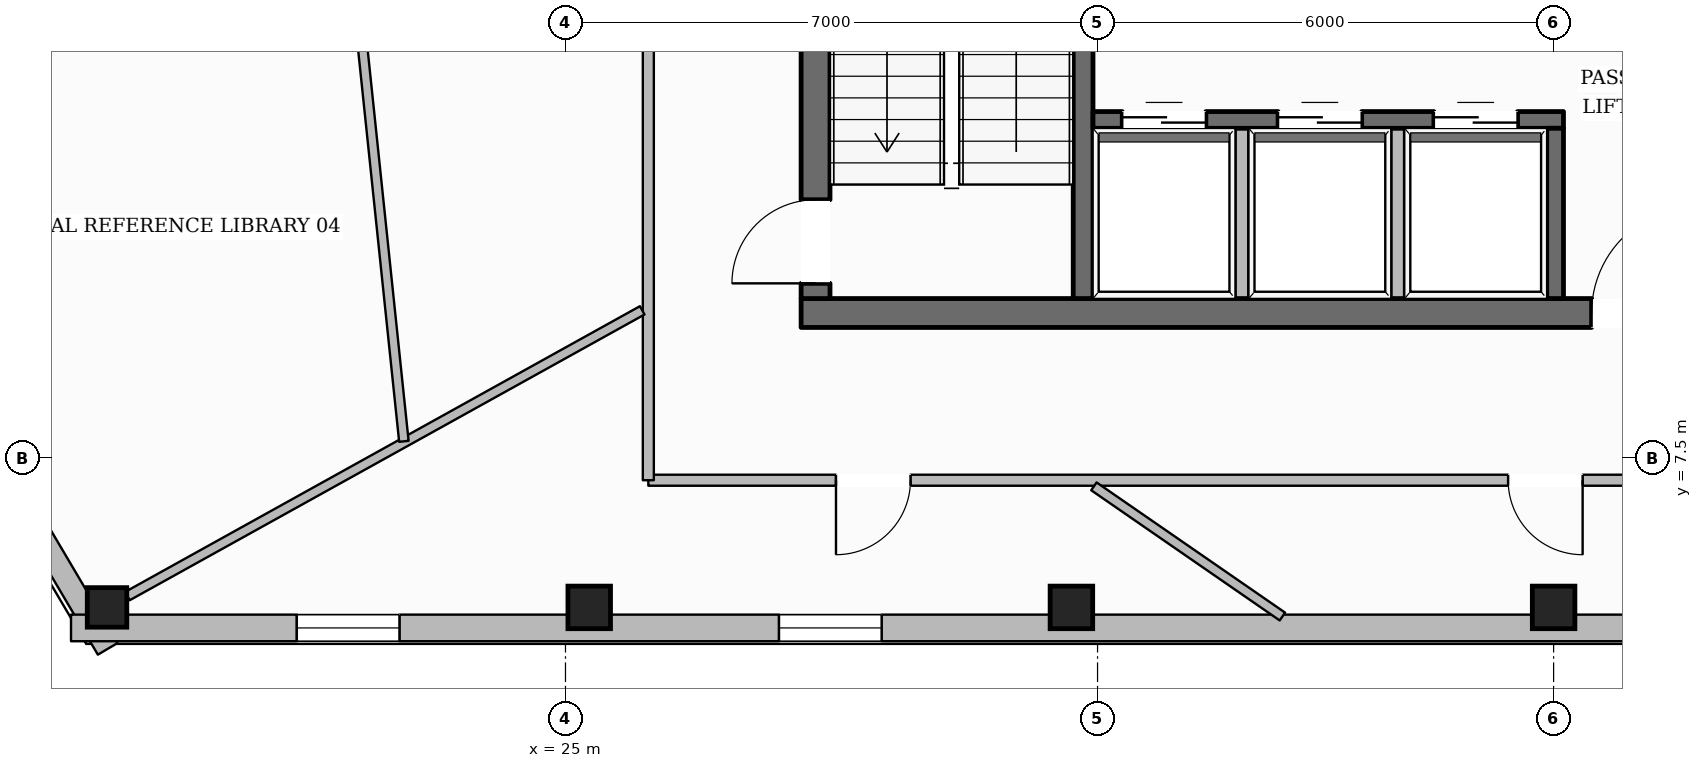
"""IFC4 building model, lengths in metres.
Left out: names, types, materials, properties, quantities, classifications, styles, units other than length and angle.
Written with IfcOpenShell. Run it as: python <this file> out.ifc"""

import sys

from ifc_helpers import new_model, si_unit, direction, frame, frame_2d, origin, origin_2d, place, context, subcontext, project, spatial, rectangle, hollow_rectangle, extrude, element, fill, save


model = new_model("IFC4")
c1 = context("Model", 3, precision=1e-05, world=origin(), true_north=direction((0.0, 1.0)))
c2 = subcontext(c1, "Body", "Model", "MODEL_VIEW")
j1 = project(units=[si_unit("LENGTHUNIT", "METRE"), si_unit("PLANEANGLEUNIT", "RADIAN")], contexts=[c1])
p1 = place(None, origin())
s1 = spatial("IfcSite", under=j1, at=p1, CompositionType="ELEMENT")
p2 = place(p1, origin())
s2 = spatial("IfcBuilding", under=s1, at=p2, CompositionType="ELEMENT")
p3 = place(p2, frame((0.0, 0.0, 274.15)))
s3 = spatial("IfcBuildingStorey", under=s2, at=p3, CompositionType="ELEMENT", Elevation=274.15)
p4 = place(p3, frame((28.1, 9.41, 0.0), z_axis=(0.0, 0.0, 1.0), x_axis=(1.0, 0.0, 0.0)))
e1 = element("IfcWall", 1, at=p4, inside=s3, PredefinedType="SOLIDWALL", context=c2, shape_type="SweptSolid", body=[
    extrude(rectangle(XDim=19.8, YDim=0.38, at=frame_2d((9.9, 0.0))), origin(), (0.0, 0.0, 1.0), 3.61),
])
p5 = place(p4, frame((10.4, 0.0, 0.0)))
e2 = element("IfcOpeningElement", 2, at=p5, cuts=e1, PredefinedType="OPENING", context=c2, shape_type="SweptSolid", body=[
    extrude(rectangle(XDim=1.4, YDim=2.2, at=frame_2d((0.7, 1.1))), frame((0.0, 0.2, 0.0), z_axis=(0.0, -1.0, 0.0), x_axis=(1.0, 0.0, 0.0)), (0.0, 0.0, 1.0), 0.4),
])
p6 = place(p3, frame((28.29, 9.6, 0.0), z_axis=(0.0, 0.0, 1.0), x_axis=(0.0, 1.0, 0.0)))
e3 = element("IfcWall", 3, at=p6, inside=s3, PredefinedType="SOLIDWALL", context=c2, shape_type="SweptSolid", body=[
    extrude(rectangle(XDim=13.0, YDim=0.38, at=frame_2d((6.5, 0.0))), origin(), (0.0, 0.0, 1.0), 3.61),
])
p7 = place(p6, frame((0.2, 0.0, 0.0)))
e4 = element("IfcOpeningElement", 4, at=p7, cuts=e3, PredefinedType="OPENING", context=c2, shape_type="SweptSolid", body=[
    extrude(rectangle(XDim=1.1, YDim=2.15, at=frame_2d((0.55, 1.075))), frame((0.0, 0.2, 0.0), z_axis=(0.0, -1.0, 0.0), x_axis=(1.0, 0.0, 0.0)), (0.0, 0.0, 1.0), 0.4),
])
p8 = place(p6, frame((8.4, 0.0, 0.0)))
e5 = element("IfcOpeningElement", 5, at=p8, cuts=e3, PredefinedType="OPENING", context=c2, shape_type="SweptSolid", body=[
    extrude(rectangle(XDim=0.9, YDim=2.1, at=frame_2d((0.45, 1.05))), frame((0.0, 0.2, 0.0), z_axis=(0.0, -1.0, 0.0), x_axis=(1.0, 0.0, 0.0)), (0.0, 0.0, 1.0), 0.4),
])
p9 = place(p3, frame((31.81, 9.6, 0.0), z_axis=(0.0, 0.0, 1.0), x_axis=(0.0, 1.0, 0.0)))
e6 = element("IfcWall", 6, at=p9, inside=s3, PredefinedType="SHEAR", context=c2, shape_type="SweptSolid", body=[
    extrude(rectangle(XDim=13.0, YDim=0.26, at=frame_2d((6.5, 0.0))), origin(), (0.0, 0.0, 1.0), 3.61),
])
p10 = place(p9, frame((10.925, 0.0, 0.0)))
e7 = element("IfcOpeningElement", 7, at=p10, cuts=e6, PredefinedType="OPENING", context=c2, shape_type="SweptSolid", body=[
    extrude(rectangle(XDim=1.25, YDim=2.25, at=frame_2d((0.625, 1.125))), frame((0.0, 0.14, 0.0), z_axis=(0.0, -1.0, 0.0), x_axis=(1.0, 0.0, 0.0)), (0.0, 0.0, 1.0), 0.28),
])
p11 = place(p3, frame((31.94, 11.95, 0.0), z_axis=(0.0, 0.0, 1.0), x_axis=(1.0, 0.0, 0.0)))
e8 = element("IfcWall", 8, at=p11, inside=s3, PredefinedType="SOLIDWALL", context=c2, shape_type="SweptSolid", body=[
    extrude(rectangle(XDim=6.19, YDim=0.22, at=frame_2d((3.095, 0.0))), origin(), (0.0, 0.0, 1.0), 3.61),
])
p12 = place(p11, frame((0.385, 0.0, 0.0)))
e9 = element("IfcOpeningElement", 9, at=p12, cuts=e8, PredefinedType="OPENING", context=c2, shape_type="SweptSolid", body=[
    extrude(rectangle(XDim=1.1, YDim=2.2, at=frame_2d((0.55, 1.1))), frame((0.0, 0.12, 0.0), z_axis=(0.0, -1.0, 0.0), x_axis=(1.0, 0.0, 0.0)), (0.0, 0.0, 1.0), 0.24),
])
p13 = place(p11, frame((2.435, 0.0, 0.0)))
e10 = element("IfcOpeningElement", 10, at=p13, cuts=e8, PredefinedType="OPENING", context=c2, shape_type="SweptSolid", body=[
    extrude(rectangle(XDim=1.1, YDim=2.2, at=frame_2d((0.55, 1.1))), frame((0.0, 0.12, 0.0), z_axis=(0.0, -1.0, 0.0), x_axis=(1.0, 0.0, 0.0)), (0.0, 0.0, 1.0), 0.24),
])
p14 = place(p11, frame((4.485, 0.0, 0.0)))
e11 = element("IfcOpeningElement", 11, at=p14, cuts=e8, PredefinedType="OPENING", context=c2, shape_type="SweptSolid", body=[
    extrude(rectangle(XDim=1.1, YDim=2.2, at=frame_2d((0.55, 1.1))), frame((0.0, 0.12, 0.0), z_axis=(0.0, -1.0, 0.0), x_axis=(1.0, 0.0, 0.0)), (0.0, 0.0, 1.0), 0.24),
])
p15 = place(p3, frame((38.02, 9.6, 0.0), z_axis=(0.0, 0.0, 1.0), x_axis=(0.0, 1.0, 0.0)))
e12 = element("IfcWall", 12, at=p15, inside=s3, PredefinedType="SOLIDWALL", context=c2, shape_type="SweptSolid", body=[
    extrude(rectangle(XDim=2.24, YDim=0.22, at=frame_2d((1.12, 0.0))), origin(), (0.0, 0.0, 1.0), 3.61),
])
p16 = place(p3, frame((18.969, 5.537, 0.0), z_axis=(0.0, 0.0, 1.0), x_axis=(1.0, 0.0, 0.0)))
e13 = element("IfcColumn", 13, at=p16, inside=s3, PredefinedType="COLUMN", context=c2, shape_type="SweptSolid", body=[
    extrude(hollow_rectangle(XDim=0.52, YDim=0.52, WallThickness=0.024, at=origin_2d()), origin(), (0.0, 0.0, 1.0), 3.61),
])
for number, where, z_axis, x_axis in (
    (14, (25.312, 5.537, 0.0), (0.0, 0.0, 1.0), (1.0, 0.0, 0.0)),
    (15, (31.656, 5.537, 0.0), (0.0, 0.0, 1.0), (1.0, 0.0, 0.0)),
    (16, (38.0, 5.537, 0.0), (0.0, 0.0, 1.0), (1.0, 0.0, 0.0)),
):
    element("IfcColumn", number, at=place(p3, frame(where, z_axis=z_axis, x_axis=x_axis)), inside=s3, PredefinedType="COLUMN", context=c2, shape_type="SweptSolid", body=[
        extrude(hollow_rectangle(XDim=0.56, YDim=0.56, WallThickness=0.025, at=origin_2d()), origin(), (0.0, 0.0, 1.0), 3.61),
    ])
p17 = place(p3, frame((15.485, 10.343, 0.0), z_axis=(0.0, 0.0, 1.0), x_axis=(0.508715156146, 0.860934892955, 0.0)))
e17 = element("IfcWall", 17, at=p17, inside=s3, PredefinedType="STANDARD", context=c2, shape_type="SweptSolid", body=[
    extrude(rectangle(XDim=38.349, YDim=0.35, at=frame_2d((19.175, 0.0))), origin(), (0.0, 0.0, 1.0), 3.196),
])
p18 = place(p17, frame((34.084, 0.0, 0.65)))
e18 = element("IfcOpeningElement", 18, at=p18, cuts=e17, PredefinedType="OPENING", context=c2, shape_type="SweptSolid", body=[
    extrude(rectangle(XDim=1.35, YDim=1.75, at=frame_2d((0.675, 0.875))), frame((0.0, 0.185, 0.0), z_axis=(0.0, -1.0, 0.0), x_axis=(1.0, 0.0, 0.0)), (0.0, 0.0, 1.0), 0.37),
])
p19 = place(p17, frame((27.852, 0.0, 0.65)))
e19 = element("IfcOpeningElement", 19, at=p19, cuts=e17, PredefinedType="OPENING", context=c2, shape_type="SweptSolid", body=[
    extrude(rectangle(XDim=1.35, YDim=1.75, at=frame_2d((0.675, 0.875))), frame((0.0, 0.185, 0.0), z_axis=(0.0, -1.0, 0.0), x_axis=(1.0, 0.0, 0.0)), (0.0, 0.0, 1.0), 0.37),
])
p20 = place(p17, frame((15.388, 0.0, 0.65)))
e20 = element("IfcOpeningElement", 20, at=p20, cuts=e17, PredefinedType="OPENING", context=c2, shape_type="SweptSolid", body=[
    extrude(rectangle(XDim=1.35, YDim=1.75, at=frame_2d((0.675, 0.875))), frame((0.0, 0.185, 0.0), z_axis=(0.0, -1.0, 0.0), x_axis=(1.0, 0.0, 0.0)), (0.0, 0.0, 1.0), 0.37),
])
p21 = place(p17, frame((9.156, 0.0, 0.65)))
e21 = element("IfcOpeningElement", 21, at=p21, cuts=e17, PredefinedType="OPENING", context=c2, shape_type="SweptSolid", body=[
    extrude(rectangle(XDim=1.35, YDim=1.75, at=frame_2d((0.675, 0.875))), frame((0.0, 0.185, 0.0), z_axis=(0.0, -1.0, 0.0), x_axis=(1.0, 0.0, 0.0)), (0.0, 0.0, 1.0), 0.37),
])
p22 = place(p17, frame((2.925, 0.0, 0.65)))
e22 = element("IfcOpeningElement", 22, at=p22, cuts=e17, PredefinedType="OPENING", context=c2, shape_type="SweptSolid", body=[
    extrude(rectangle(XDim=1.35, YDim=1.75, at=frame_2d((0.675, 0.875))), frame((0.0, 0.185, 0.0), z_axis=(0.0, -1.0, 0.0), x_axis=(1.0, 0.0, 0.0)), (0.0, 0.0, 1.0), 0.37),
])
p23 = place(p3, frame((18.977, 4.991, 0.0), z_axis=(0.0, 0.0, 1.0), x_axis=(-0.508725717469, 0.86092865232, 0.0)))
e23 = element("IfcWall", 23, at=p23, inside=s3, PredefinedType="STANDARD", context=c2, shape_type="SweptSolid", body=[
    extrude(rectangle(XDim=6.865, YDim=0.3, at=frame_2d((3.432, 0.0))), origin(), (0.0, 0.0, 1.0), 3.196),
])
p24 = place(p23, frame((2.907, 0.0, 0.65)))
e24 = element("IfcOpeningElement", 24, at=p24, cuts=e23, PredefinedType="OPENING", context=c2, shape_type="SweptSolid", body=[
    extrude(rectangle(XDim=1.05, YDim=1.7, at=frame_2d((0.525, 0.85))), frame((0.0, 0.16, 0.0), z_axis=(0.0, -1.0, 0.0), x_axis=(1.0, 0.0, 0.0)), (0.0, 0.0, 1.0), 0.32),
])
p25 = place(p3, frame((57.505, 5.267, 0.0), z_axis=(0.0, 0.0, 1.0), x_axis=(-1.0, 0.0, 0.0)))
e25 = element("IfcWall", 25, at=p25, inside=s3, PredefinedType="STANDARD", context=c2, shape_type="SweptSolid", body=[
    extrude(rectangle(XDim=39.011, YDim=0.35, at=frame_2d((19.505, 0.0))), origin(), (0.0, 0.0, 1.0), 3.196),
])
p26 = place(p25, frame((34.69, 0.0, 0.65)))
e26 = element("IfcOpeningElement", 26, at=p26, cuts=e25, PredefinedType="OPENING", context=c2, shape_type="SweptSolid", body=[
    extrude(rectangle(XDim=1.35, YDim=1.75, at=frame_2d((0.675, 0.875))), frame((0.0, 0.185, 0.0), z_axis=(0.0, -1.0, 0.0), x_axis=(1.0, 0.0, 0.0)), (0.0, 0.0, 1.0), 0.37),
])
p27 = place(p25, frame((28.346, 0.0, 0.65)))
e27 = element("IfcOpeningElement", 27, at=p27, cuts=e25, PredefinedType="OPENING", context=c2, shape_type="SweptSolid", body=[
    extrude(rectangle(XDim=1.35, YDim=1.75, at=frame_2d((0.675, 0.875))), frame((0.0, 0.185, 0.0), z_axis=(0.0, -1.0, 0.0), x_axis=(1.0, 0.0, 0.0)), (0.0, 0.0, 1.0), 0.37),
])
p28 = place(p25, frame((15.658, 0.0, 0.65)))
e28 = element("IfcOpeningElement", 28, at=p28, cuts=e25, PredefinedType="OPENING", context=c2, shape_type="SweptSolid", body=[
    extrude(rectangle(XDim=1.35, YDim=1.75, at=frame_2d((0.675, 0.875))), frame((0.0, 0.185, 0.0), z_axis=(0.0, -1.0, 0.0), x_axis=(1.0, 0.0, 0.0)), (0.0, 0.0, 1.0), 0.37),
])
p29 = place(p25, frame((9.315, 0.0, 0.65)))
e29 = element("IfcOpeningElement", 29, at=p29, cuts=e25, PredefinedType="OPENING", context=c2, shape_type="SweptSolid", body=[
    extrude(rectangle(XDim=1.35, YDim=1.75, at=frame_2d((0.675, 0.875))), frame((0.0, 0.185, 0.0), z_axis=(0.0, -1.0, 0.0), x_axis=(1.0, 0.0, 0.0)), (0.0, 0.0, 1.0), 0.37),
])
p30 = place(p25, frame((2.971, 0.0, 0.65)))
e30 = element("IfcOpeningElement", 30, at=p30, cuts=e25, PredefinedType="OPENING", context=c2, shape_type="SweptSolid", body=[
    extrude(rectangle(XDim=1.35, YDim=1.75, at=frame_2d((0.675, 0.875))), frame((0.0, 0.185, 0.0), z_axis=(0.0, -1.0, 0.0), x_axis=(1.0, 0.0, 0.0)), (0.0, 0.0, 1.0), 0.37),
])
for number, where, z_axis, x_axis in (
    (31, (33.9, 9.49, 0.0), (0.0, 0.0, 1.0), (0.0, 1.0, 0.0)),
    (32, (35.95, 9.49, 0.0), (0.0, 0.0, 1.0), (0.0, 1.0, 0.0)),
):
    element("IfcWall", number, at=place(p3, frame(where, z_axis=z_axis, x_axis=x_axis)), inside=s3, PredefinedType="PARTITIONING", context=c2, shape_type="SweptSolid", body=[
        extrude(rectangle(XDim=2.35, YDim=0.165, at=frame_2d((1.175, 0.0))), origin(), (0.0, 0.0, 1.0), 3.61),
    ])
p31 = place(p3, frame((49.91, 7.21, 0.0), z_axis=(0.0, 0.0, 1.0), x_axis=(-1.0, 0.0, 0.0)))
e33 = element("IfcWall", 33, at=p31, inside=s3, PredefinedType="PARTITIONING", context=c2, shape_type="SweptSolid", body=[
    extrude(rectangle(XDim=23.82, YDim=0.145, at=frame_2d((11.91, 0.0))), origin(), (0.0, 0.0, 1.0), 3.61),
])
p32 = place(p31, frame((11.528, 0.0, 0.0)))
e34 = element("IfcOpeningElement", 34, at=p32, cuts=e33, PredefinedType="OPENING", context=c2, shape_type="SweptSolid", body=[
    extrude(rectangle(XDim=0.98, YDim=2.15, at=frame_2d((0.49, 1.075))), frame((0.0, 0.083, 0.0), z_axis=(0.0, -1.0, 0.0), x_axis=(1.0, 0.0, 0.0)), (0.0, 0.0, 1.0), 0.165),
])
p33 = place(p31, frame((20.371, 0.0, 0.0)))
e35 = element("IfcOpeningElement", 35, at=p33, cuts=e33, PredefinedType="OPENING", context=c2, shape_type="SweptSolid", body=[
    extrude(rectangle(XDim=0.98, YDim=2.15, at=frame_2d((0.49, 1.075))), frame((0.0, 0.083, 0.0), z_axis=(0.0, -1.0, 0.0), x_axis=(1.0, 0.0, 0.0)), (0.0, 0.0, 1.0), 0.165),
])
p34 = place(p31, frame((2.444, 0.0, 0.0)))
e36 = element("IfcOpeningElement", 36, at=p34, cuts=e33, PredefinedType="OPENING", context=c2, shape_type="SweptSolid", body=[
    extrude(rectangle(XDim=1.4, YDim=2.2, at=frame_2d((0.7, 1.1))), frame((0.0, 0.083, 0.0), z_axis=(0.0, -1.0, 0.0), x_axis=(1.0, 0.0, 0.0)), (0.0, 0.0, 1.0), 0.165),
])
p35 = place(p3, frame((26.09, 7.21, 0.0), z_axis=(0.0, 0.0, 1.0), x_axis=(0.0, 1.0, 0.0)))
e37 = element("IfcWall", 37, at=p35, inside=s3, PredefinedType="PARTITIONING", context=c2, shape_type="SweptSolid", body=[
    extrude(rectangle(XDim=17.78, YDim=0.145, at=frame_2d((8.89, 0.0))), origin(), (0.0, 0.0, 1.0), 3.349),
])
p36 = place(p35, frame((9.425, 0.0, 0.0)))
e38 = element("IfcOpeningElement", 38, at=p36, cuts=e37, PredefinedType="OPENING", context=c2, shape_type="SweptSolid", body=[
    extrude(rectangle(XDim=1.02, YDim=2.15, at=frame_2d((0.51, 1.075))), frame((0.0, 0.083, 0.0), z_axis=(0.0, -1.0, 0.0), x_axis=(1.0, 0.0, 0.0)), (0.0, 0.0, 1.0), 0.165),
])
p37 = place(p3, frame((26.01, 9.445, 0.0), z_axis=(0.0, 0.0, 1.0), x_axis=(-0.874347500964, -0.485300368389, 0.0)))
e39 = element("IfcWall", 39, at=p37, inside=s3, PredefinedType="PARTITIONING", context=c2, shape_type="SweptSolid", body=[
    extrude(rectangle(XDim=7.746, YDim=0.125, at=frame_2d((3.873, 0.0))), origin(), (0.0, 0.0, 1.0), 3.246),
])
p38 = place(p3, frame((21.555, 20.321, 0.0), z_axis=(0.0, 0.0, 1.0), x_axis=(0.104108921444, -0.994565901525, 0.0)))
e40 = element("IfcWall", 40, at=p38, inside=s3, PredefinedType="PARTITIONING", context=c2, shape_type="SweptSolid", body=[
    extrude(rectangle(XDim=12.668, YDim=0.125, at=frame_2d((6.334, 0.0))), origin(), (0.0, 0.0, 1.0), 3.349),
])
p39 = place(p38, frame((5.731, 0.0, 0.0)))
e41 = element("IfcOpeningElement", 41, at=p39, cuts=e40, PredefinedType="OPENING", context=c2, shape_type="SweptSolid", body=[
    extrude(rectangle(XDim=0.98, YDim=2.15, at=frame_2d((0.49, 1.075))), frame((0.0, 0.073, 0.0), z_axis=(0.0, -1.0, 0.0), x_axis=(1.0, 0.0, 0.0)), (0.0, 0.0, 1.0), 0.145),
])
p40 = place(p3, frame((31.952, 7.129, 0.0), z_axis=(0.0, 0.0, 1.0), x_axis=(0.82280128664, -0.568329167564, 0.0)))
e42 = element("IfcWall", 42, at=p40, inside=s3, PredefinedType="PARTITIONING", context=c2, shape_type="SweptSolid", body=[
    extrude(rectangle(XDim=3.013, YDim=0.125, at=frame_2d((1.507, 0.0))), origin(), (0.0, 0.0, 1.0), 3.61),
])
p41 = place(p26, origin())
e43 = element("IfcWindow", 43, at=p41, inside=s3, PartitioningType="SINGLE_PANEL", PredefinedType="WINDOW", context=c2, shape_type="SweptSolid", body=[
    extrude(rectangle(XDim=1.35, YDim=1.75, at=frame_2d((0.675, 0.875))), frame((0.0, 0.03, 0.0), z_axis=(0.0, -1.0, 0.0), x_axis=(1.0, 0.0, 0.0)), (0.0, 0.0, 1.0), 0.06),
])
fill(e26, e43)
p42 = place(p27, origin())
e44 = element("IfcWindow", 44, at=p42, inside=s3, PartitioningType="SINGLE_PANEL", PredefinedType="WINDOW", context=c2, shape_type="SweptSolid", body=[
    extrude(rectangle(XDim=1.35, YDim=1.75, at=frame_2d((0.675, 0.875))), frame((0.0, 0.03, 0.0), z_axis=(0.0, -1.0, 0.0), x_axis=(1.0, 0.0, 0.0)), (0.0, 0.0, 1.0), 0.06),
])
fill(e27, e44)
p43 = place(p7, origin())
e45 = element("IfcDoor", 45, at=p43, inside=s3, OperationType="SINGLE_SWING_LEFT", PredefinedType="DOOR", context=c2, shape_type="SweptSolid", body=[
    extrude(rectangle(XDim=1.1, YDim=2.15, at=frame_2d((0.55, 1.075))), frame((0.0, 0.025, 0.0), z_axis=(0.0, -1.0, 0.0), x_axis=(1.0, 0.0, 0.0)), (0.0, 0.0, 1.0), 0.05),
])
fill(e4, e45)
p44 = place(p5, origin())
e46 = element("IfcDoor", 46, at=p44, inside=s3, OperationType="SINGLE_SWING_RIGHT", PredefinedType="DOOR", context=c2, shape_type="SweptSolid", body=[
    extrude(rectangle(XDim=1.4, YDim=2.2, at=frame_2d((0.7, 1.1))), frame((0.0, 0.025, 0.0), z_axis=(0.0, -1.0, 0.0), x_axis=(1.0, 0.0, 0.0)), (0.0, 0.0, 1.0), 0.05),
])
fill(e2, e46)
p45 = place(p12, origin())
e47 = element("IfcDoor", 47, at=p45, inside=s3, OperationType="DOUBLE_DOOR_SLIDING", PredefinedType="DOOR", context=c2, shape_type="SweptSolid", body=[
    extrude(rectangle(XDim=1.1, YDim=2.2, at=frame_2d((0.55, 1.1))), frame((0.0, 0.025, 0.0), z_axis=(0.0, -1.0, 0.0), x_axis=(1.0, 0.0, 0.0)), (0.0, 0.0, 1.0), 0.05),
])
fill(e9, e47)
p46 = place(p13, origin())
e48 = element("IfcDoor", 48, at=p46, inside=s3, OperationType="DOUBLE_DOOR_SLIDING", PredefinedType="DOOR", context=c2, shape_type="SweptSolid", body=[
    extrude(rectangle(XDim=1.1, YDim=2.2, at=frame_2d((0.55, 1.1))), frame((0.0, 0.025, 0.0), z_axis=(0.0, -1.0, 0.0), x_axis=(1.0, 0.0, 0.0)), (0.0, 0.0, 1.0), 0.05),
])
fill(e10, e48)
p47 = place(p14, origin())
e49 = element("IfcDoor", 49, at=p47, inside=s3, OperationType="DOUBLE_DOOR_SLIDING", PredefinedType="DOOR", context=c2, shape_type="SweptSolid", body=[
    extrude(rectangle(XDim=1.1, YDim=2.2, at=frame_2d((0.55, 1.1))), frame((0.0, 0.025, 0.0), z_axis=(0.0, -1.0, 0.0), x_axis=(1.0, 0.0, 0.0)), (0.0, 0.0, 1.0), 0.05),
])
fill(e11, e49)
p48 = place(p32, origin())
e50 = element("IfcDoor", 50, at=p48, inside=s3, OperationType="SINGLE_SWING_LEFT", PredefinedType="DOOR", context=c2, shape_type="SweptSolid", body=[
    extrude(rectangle(XDim=0.98, YDim=2.15, at=frame_2d((0.49, 1.075))), frame((0.0, 0.025, 0.0), z_axis=(0.0, -1.0, 0.0), x_axis=(1.0, 0.0, 0.0)), (0.0, 0.0, 1.0), 0.05),
])
fill(e34, e50)
p49 = place(p33, origin())
e51 = element("IfcDoor", 51, at=p49, inside=s3, OperationType="SINGLE_SWING_RIGHT", PredefinedType="DOOR", context=c2, shape_type="SweptSolid", body=[
    extrude(rectangle(XDim=0.98, YDim=2.15, at=frame_2d((0.49, 1.075))), frame((0.0, 0.025, 0.0), z_axis=(0.0, -1.0, 0.0), x_axis=(1.0, 0.0, 0.0)), (0.0, 0.0, 1.0), 0.05),
])
fill(e35, e51)
save(model, sys.argv[1])
